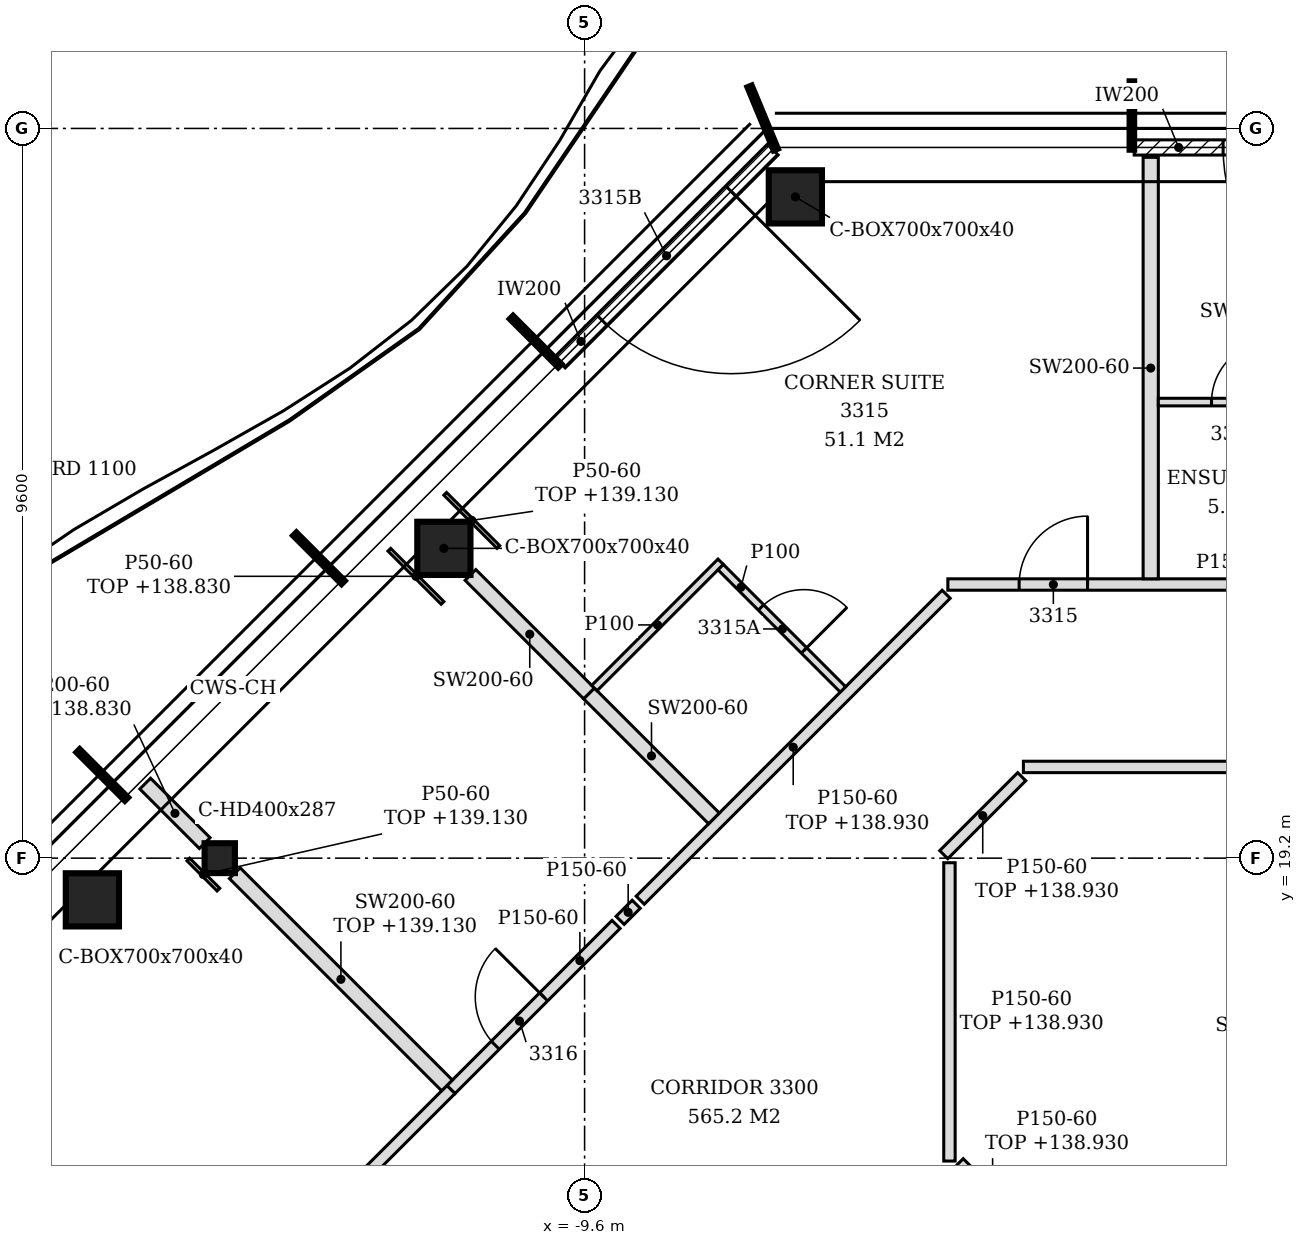
"""IFC4 building model, lengths in metres.
Left out: names, types, materials, properties, quantities, classifications, styles, units other than length and angle.
Written with IfcOpenShell. Run it as: python <this file> out.ifc"""

import sys

from ifc_helpers import new_model, si_unit, direction, frame, frame_2d, origin, origin_2d, place, context, subcontext, project, spatial, polyline, rectangle, hollow_rectangle, i_section, outline, extrude, element, fill, save


model = new_model("IFC4")
c1 = context("Model", 3, precision=1e-05, world=origin(), true_north=direction((0.0, 1.0)))
c2 = subcontext(c1, "Body", "Model", "MODEL_VIEW")
j1 = project(units=[si_unit("LENGTHUNIT", "METRE"), si_unit("PLANEANGLEUNIT", "RADIAN")], contexts=[c1])
p1 = place(None, origin())
s1 = spatial("IfcSite", under=j1, at=p1, CompositionType="ELEMENT")
p2 = place(p1, origin())
s2 = spatial("IfcBuilding", under=s1, at=p2, CompositionType="ELEMENT")
p3 = place(p2, frame((0.0, 0.0, 136.2)))
s3 = spatial("IfcBuildingStorey", under=s2, at=p3, CompositionType="ELEMENT", Elevation=136.2)
for number, where, z_axis, x_axis in (
    (1, (-6.827, 27.9, -0.15), (0.0, 0.0, 1.0), (1.0, 0.0, 0.0)),
    (2, (-11.451, 23.276, -0.15), (0.0, 0.0, 1.0), (1.0, 0.0, 0.0)),
    (3, (-16.076, 18.652, -0.15), (0.0, 0.0, 1.0), (1.0, 0.0, 0.0)),
):
    element("IfcColumn", number, at=place(p3, frame(where, z_axis=z_axis, x_axis=x_axis)), inside=s3, PredefinedType="COLUMN", context=c2, shape_type="SweptSolid", body=[
        extrude(hollow_rectangle(XDim=0.7, YDim=0.7, WallThickness=0.04, at=origin_2d()), origin(), (0.0, 0.0, 1.0), 3.6),
    ])
p4 = place(p3, frame((-14.4, 19.2, -0.15), z_axis=(0.0, 0.0, 1.0), x_axis=(1.0, 0.0, 0.0)))
e4 = element("IfcColumn", 4, at=p4, inside=s3, PredefinedType="COLUMN", context=c2, shape_type="SweptSolid", body=[
    extrude(i_section(OverallWidth=0.399, OverallDepth=0.393, WebThickness=0.023, FlangeThickness=0.037, FilletRadius=0.015, at=origin_2d()), origin(), (0.0, 0.0, 1.0), 3.6),
])
p5 = place(p3, frame((2.37, 28.55, 0.0), z_axis=(0.0, 0.0, 1.0), x_axis=(-1.0, 0.0, 0.0)))
e5 = element("IfcWall", 5, at=p5, inside=s3, PredefinedType="NOTDEFINED", context=c2, shape_type="SweptSolid", body=[
    extrude(rectangle(XDim=4.74, YDim=0.2, at=frame_2d((2.37, 0.0))), origin(), (0.0, 0.0, 1.0), 3.45),
])
p6 = place(p5, frame((1.17, 0.0, 0.0)))
e6 = element("IfcOpeningElement", 6, at=p6, cuts=e5, PredefinedType="OPENING", context=c2, shape_type="SweptSolid", body=[
    extrude(rectangle(XDim=2.4, YDim=2.4, at=frame_2d((1.2, 1.2))), frame((0.0, 0.11, 0.0), z_axis=(0.0, -1.0, 0.0), x_axis=(1.0, 0.0, 0.0)), (0.0, 0.0, 1.0), 0.22),
])
p7 = place(p3, frame((-7.125, 28.522, 0.0), z_axis=(0.0, 0.0, 1.0), x_axis=(-0.707106781187, -0.707106781187, 0.0)))
e7 = element("IfcWall", 7, at=p7, inside=s3, PredefinedType="NOTDEFINED", context=c2, shape_type="SweptSolid", body=[
    extrude(rectangle(XDim=3.962, YDim=0.2, at=frame_2d((1.981, 0.0))), origin(), (0.0, 0.0, 1.0), 3.45),
])
p8 = place(p7, frame((0.775, 0.0, 0.0)))
e8 = element("IfcOpeningElement", 8, at=p8, cuts=e7, PredefinedType="OPENING", context=c2, shape_type="SweptSolid", body=[
    extrude(rectangle(XDim=2.4, YDim=2.4, at=frame_2d((1.2, 1.2))), frame((0.0, 0.11, 0.0), z_axis=(0.0, -1.0, 0.0), x_axis=(1.0, 0.0, 0.0)), (0.0, 0.0, 1.0), 0.22),
])
p9 = place(p3, frame((-15.675, 11.84, 0.0), z_axis=(0.0, 0.0, 1.0), x_axis=(0.707206735496, 0.707006812746, 0.0)))
e9 = element("IfcWall", 9, at=p9, inside=s3, PredefinedType="PARTITIONING", context=c2, shape_type="SweptSolid", body=[
    extrude(rectangle(XDim=6.106, YDim=0.15, at=frame_2d((3.053, 0.0))), origin(), (0.0, 0.0, 1.0), 2.93),
])
p10 = place(p9, frame((2.656, 0.0, 0.0)))
e10 = element("IfcOpeningElement", 10, at=p10, cuts=e9, PredefinedType="OPENING", context=c2, shape_type="SweptSolid", body=[
    extrude(rectangle(XDim=0.9, YDim=2.1, at=frame_2d((0.45, 1.05))), frame((0.0, 0.085, 0.0), z_axis=(0.0, -1.0, 0.0), x_axis=(1.0, 0.0, 0.0)), (0.0, 0.0, 1.0), 0.17),
])
p11 = place(p3, frame((-3.792, 14.314, 0.0), z_axis=(0.0, 0.0, 1.0), x_axis=(-0.707499182195, 0.706714162298, 0.0)))
e11 = element("IfcWall", 11, at=p11, inside=s3, PredefinedType="PARTITIONING", context=c2, shape_type="SweptSolid", body=[
    extrude(rectangle(XDim=1.244, YDim=0.15, at=frame_2d((0.622, 0.0))), origin(), (0.0, 0.0, 1.0), 2.73),
])
p12 = place(p3, frame((-4.8, 15.215, 0.0), z_axis=(0.0, 0.0, 1.0), x_axis=(0.0, 1.0, 0.0)))
e12 = element("IfcWall", 12, at=p12, inside=s3, PredefinedType="PARTITIONING", context=c2, shape_type="SweptSolid", body=[
    extrude(rectangle(XDim=3.925, YDim=0.15, at=frame_2d((1.962, 0.0))), origin(), (0.0, 0.0, 1.0), 2.73),
])
p13 = place(p3, frame((-11.357, 16.157, 0.0), z_axis=(0.0, 0.0, 1.0), x_axis=(0.707106781187, 0.707106781187, 0.0)))
e13 = element("IfcWall", 13, at=p13, inside=s3, PredefinedType="PARTITIONING", context=c2, shape_type="SweptSolid", body=[
    extrude(rectangle(XDim=3.071, YDim=0.15, at=frame_2d((1.535, 0.0))), origin(), (0.0, 0.0, 1.0), 3.45),
])
p14 = place(p13, frame((0.823, 0.0, 0.0)))
e14 = element("IfcOpeningElement", 14, at=p14, cuts=e13, PredefinedType="OPENING", context=c2, shape_type="SweptSolid", body=[
    extrude(rectangle(XDim=0.9, YDim=2.1, at=frame_2d((0.45, 1.05))), frame((0.0, 0.085, 0.0), z_axis=(0.0, -1.0, 0.0), x_axis=(1.0, 0.0, 0.0)), (0.0, 0.0, 1.0), 0.17),
])
p15 = place(p3, frame((-11.41, 16.21, 0.0), z_axis=(0.0, 0.0, 1.0), x_axis=(-0.707106781187, 0.707106781187, 0.0)))
e15 = element("IfcWall", 15, at=p15, inside=s3, PredefinedType="PARTITIONING", context=c2, shape_type="SweptSolid", body=[
    extrude(rectangle(XDim=3.948, YDim=0.2, at=frame_2d((1.974, 0.0))), origin(), (0.0, 0.0, 1.0), 2.93),
])
p16 = place(p3, frame((-9.133, 18.382, 0.0), z_axis=(0.0, 0.0, 1.0), x_axis=(0.707106781187, 0.707106781187, 0.0)))
e16 = element("IfcWall", 16, at=p16, inside=s3, PredefinedType="PARTITIONING", context=c2, shape_type="SweptSolid", body=[
    extrude(rectangle(XDim=0.3, YDim=0.15, at=frame_2d((0.15, 0.0))), origin(), (0.0, 0.0, 1.0), 3.45),
])
p17 = place(p3, frame((-8.868, 18.647, 0.0), z_axis=(0.0, 0.0, 1.0), x_axis=(0.707085337138, 0.707128224585, 0.0)))
e17 = element("IfcWall", 17, at=p17, inside=s3, PredefinedType="PARTITIONING", context=c2, shape_type="SweptSolid", body=[
    extrude(rectangle(XDim=5.693, YDim=0.15, at=frame_2d((2.846, 0.0))), origin(), (0.0, 0.0, 1.0), 2.73),
])
p18 = place(p3, frame((-4.875, 19.246, 0.0), z_axis=(0.0, 0.0, 1.0), x_axis=(0.707106781187, 0.707106781187, 0.0)))
e18 = element("IfcWall", 18, at=p18, inside=s3, PredefinedType="PARTITIONING", context=c2, shape_type="SweptSolid", body=[
    extrude(rectangle(XDim=1.451, YDim=0.15, at=frame_2d((0.726, 0.0))), origin(), (0.0, 0.0, 1.0), 2.73),
])
p19 = place(p3, frame((-14.598, 19.398, 0.0), z_axis=(0.0, 0.0, 1.0), x_axis=(-0.707106781187, 0.707106781187, 0.0)))
e19 = element("IfcWall", 19, at=p19, inside=s3, PredefinedType="PARTITIONING", context=c2, shape_type="SweptSolid", body=[
    extrude(rectangle(XDim=1.107, YDim=0.2, at=frame_2d((0.554, 0.0))), origin(), (0.0, 0.0, 1.0), 2.63),
])
p20 = place(p3, frame((-7.898, 19.723, 0.0), z_axis=(0.0, 0.0, 1.0), x_axis=(-0.707106781187, 0.707106781187, 0.0)))
e20 = element("IfcWall", 20, at=p20, inside=s3, PredefinedType="PARTITIONING", context=c2, shape_type="SweptSolid", body=[
    extrude(rectangle(XDim=2.325, YDim=0.2, at=frame_2d((1.163, 0.0))), origin(), (0.0, 0.0, 1.0), 3.45),
])
p21 = place(p3, frame((-3.827, 20.4, 0.0), z_axis=(0.0, 0.0, 1.0), x_axis=(1.0, 0.0, 0.0)))
e21 = element("IfcWall", 21, at=p21, inside=s3, PredefinedType="PARTITIONING", context=c2, shape_type="SweptSolid", body=[
    extrude(rectangle(XDim=8.702, YDim=0.15, at=frame_2d((4.351, 0.0))), origin(), (0.0, 0.0, 1.0), 3.45),
])
p22 = place(p3, frame((-9.542, 21.367, 0.0), z_axis=(0.0, 0.0, 1.0), x_axis=(-0.707217500167, 0.706996044867, 0.0)))
e22 = element("IfcWall", 22, at=p22, inside=s3, PredefinedType="PARTITIONING", context=c2, shape_type="SweptSolid", body=[
    extrude(rectangle(XDim=2.205, YDim=0.2, at=frame_2d((1.103, 0.0))), origin(), (0.0, 0.0, 1.0), 3.45),
])
p23 = place(p3, frame((-9.471, 21.438, 0.0), z_axis=(0.0, 0.0, 1.0), x_axis=(0.707054828152, 0.707158730404, 0.0)))
e23 = element("IfcWall", 23, at=p23, inside=s3, PredefinedType="PARTITIONING", context=c2, shape_type="SweptSolid", body=[
    extrude(rectangle(XDim=2.35, YDim=0.1, at=frame_2d((1.175, 0.0))), origin(), (0.0, 0.0, 1.0), 3.45),
])
p24 = place(p3, frame((-6.201, 21.42, 0.0), z_axis=(0.0, 0.0, 1.0), x_axis=(-0.707106781187, 0.707106781187, 0.0)))
e24 = element("IfcWall", 24, at=p24, inside=s3, PredefinedType="PARTITIONING", context=c2, shape_type="SweptSolid", body=[
    extrude(rectangle(XDim=2.275, YDim=0.1, at=frame_2d((1.137, 0.0))), origin(), (0.0, 0.0, 1.0), 3.45),
])
p25 = place(p24, frame((0.725, 0.0, 0.0)))
e25 = element("IfcOpeningElement", 25, at=p25, cuts=e24, PredefinedType="OPENING", context=c2, shape_type="SweptSolid", body=[
    extrude(rectangle(XDim=0.8, YDim=2.1, at=frame_2d((0.4, 1.05))), frame((0.0, 0.06, 0.0), z_axis=(0.0, -1.0, 0.0), x_axis=(1.0, 0.0, 0.0)), (0.0, 0.0, 1.0), 0.12),
])
p26 = place(p3, frame((-4.821, 22.8, 0.0), z_axis=(0.0, 0.0, 1.0), x_axis=(1.0, 0.0, 0.0)))
e26 = element("IfcWall", 26, at=p26, inside=s3, PredefinedType="PARTITIONING", context=c2, shape_type="SweptSolid", body=[
    extrude(outline(polyline([(0.0, 0.0), (24.042, 0.0), (24.042, 2.73), (23.871, 2.73), (23.869, 3.45), (12.171, 3.45), (12.169, 2.73), (11.871, 2.73), (11.869, 3.45), (0.171, 3.45), (0.169, 2.73), (0.0, 2.73), (0.0, 0.0)])), frame((0.0, 0.075, 0.0), z_axis=(0.0, -1.0, 0.0), x_axis=(1.0, 0.0, 0.0)), (0.0, 0.0, 1.0), 0.15),
])
p27 = place(p26, frame((22.205, 0.0, 0.0)))
e27 = element("IfcOpeningElement", 27, at=p27, cuts=e26, PredefinedType="OPENING", context=c2, shape_type="SweptSolid", body=[
    extrude(rectangle(XDim=0.9, YDim=2.1, at=frame_2d((0.45, 1.05))), frame((0.0, 0.085, 0.0), z_axis=(0.0, -1.0, 0.0), x_axis=(1.0, 0.0, 0.0)), (0.0, 0.0, 1.0), 0.17),
])
p28 = place(p26, frame((19.785, 0.0, 0.0)))
e28 = element("IfcOpeningElement", 28, at=p28, cuts=e26, PredefinedType="OPENING", context=c2, shape_type="SweptSolid", body=[
    extrude(rectangle(XDim=0.9, YDim=2.1, at=frame_2d((0.45, 1.05))), frame((0.0, 0.085, 0.0), z_axis=(0.0, -1.0, 0.0), x_axis=(1.0, 0.0, 0.0)), (0.0, 0.0, 1.0), 0.17),
])
p29 = place(p26, frame((15.109, 0.0, 0.0)))
e29 = element("IfcOpeningElement", 29, at=p29, cuts=e26, PredefinedType="OPENING", context=c2, shape_type="SweptSolid", body=[
    extrude(rectangle(XDim=0.9, YDim=2.1, at=frame_2d((0.45, 1.05))), frame((0.0, 0.085, 0.0), z_axis=(0.0, -1.0, 0.0), x_axis=(1.0, 0.0, 0.0)), (0.0, 0.0, 1.0), 0.17),
])
p30 = place(p26, frame((10.433, 0.0, 0.0)))
e30 = element("IfcOpeningElement", 30, at=p30, cuts=e26, PredefinedType="OPENING", context=c2, shape_type="SweptSolid", body=[
    extrude(rectangle(XDim=0.9, YDim=2.1, at=frame_2d((0.45, 1.05))), frame((0.0, 0.085, 0.0), z_axis=(0.0, -1.0, 0.0), x_axis=(1.0, 0.0, 0.0)), (0.0, 0.0, 1.0), 0.17),
])
p31 = place(p26, frame((5.757, 0.0, 0.0)))
e31 = element("IfcOpeningElement", 31, at=p31, cuts=e26, PredefinedType="OPENING", context=c2, shape_type="SweptSolid", body=[
    extrude(rectangle(XDim=0.9, YDim=2.1, at=frame_2d((0.45, 1.05))), frame((0.0, 0.085, 0.0), z_axis=(0.0, -1.0, 0.0), x_axis=(1.0, 0.0, 0.0)), (0.0, 0.0, 1.0), 0.17),
])
p32 = place(p26, frame((0.938, 0.0, 0.0)))
e32 = element("IfcOpeningElement", 32, at=p32, cuts=e26, PredefinedType="OPENING", context=c2, shape_type="SweptSolid", body=[
    extrude(rectangle(XDim=0.9, YDim=2.1, at=frame_2d((0.45, 1.05))), frame((0.0, 0.085, 0.0), z_axis=(0.0, -1.0, 0.0), x_axis=(1.0, 0.0, 0.0)), (0.0, 0.0, 1.0), 0.17),
])
p33 = place(p3, frame((-2.152, 22.875, 0.0), z_axis=(0.0, 0.0, 1.0), x_axis=(0.0, 1.0, 0.0)))
e33 = element("IfcWall", 33, at=p33, inside=s3, PredefinedType="PARTITIONING", context=c2, shape_type="SweptSolid", body=[
    extrude(outline(polyline([(0.0, 0.0), (5.545, 0.0), (5.545, 3.45), (5.175, 3.45), (5.173, 2.93), (4.875, 2.93), (4.873, 3.45), (1.23, 3.45), (1.228, 2.88), (1.02, 2.88), (1.018, 3.45), (0.0, 3.45), (0.0, 0.0)])), frame((0.0, 0.1, 0.0), z_axis=(0.0, -1.0, 0.0), x_axis=(1.0, 0.0, 0.0)), (0.0, 0.0, 1.0), 0.2),
])
p34 = place(p3, frame((-2.052, 25.2, 0.0), z_axis=(0.0, 0.0, 1.0), x_axis=(1.0, 0.0, 0.0)))
e34 = element("IfcWall", 34, at=p34, inside=s3, PredefinedType="PARTITIONING", context=c2, shape_type="SweptSolid", body=[
    extrude(rectangle(XDim=2.35, YDim=0.1, at=frame_2d((1.175, 0.0))), origin(), (0.0, 0.0, 1.0), 3.45),
])
p35 = place(p34, frame((0.7, 0.0, 0.0)))
e35 = element("IfcOpeningElement", 35, at=p35, cuts=e34, PredefinedType="OPENING", context=c2, shape_type="SweptSolid", body=[
    extrude(rectangle(XDim=0.8, YDim=2.1, at=frame_2d((0.4, 1.05))), frame((0.0, 0.06, 0.0), z_axis=(0.0, -1.0, 0.0), x_axis=(1.0, 0.0, 0.0)), (0.0, 0.0, 1.0), 0.12),
])
p36 = place(p3, frame((-14.418, 18.786, 0.0), z_axis=(0.0, 0.0, 1.0), x_axis=(-0.707106781187, 0.707106781187, 0.0)))
e36 = element("IfcWall", 36, at=p36, inside=s3, PredefinedType="PARTITIONING", context=c2, shape_type="SweptSolid", body=[
    extrude(rectangle(XDim=0.56, YDim=0.05, at=frame_2d((0.28, 0.0))), origin(), (0.0, 0.0, 1.0), 2.93),
])
p37 = place(p3, frame((-11.469, 22.558, 0.0), z_axis=(0.0, 0.0, 1.0), x_axis=(-0.707353374636, 0.706860101711, 0.0)))
e37 = element("IfcWall", 37, at=p37, inside=s3, PredefinedType="PARTITIONING", context=c2, shape_type="SweptSolid", body=[
    extrude(rectangle(XDim=0.99, YDim=0.05, at=frame_2d((0.495, 0.0))), origin(), (0.0, 0.0, 1.0), 2.63),
])
p38 = place(p3, frame((-10.734, 23.293, 0.0), z_axis=(0.0, 0.0, 1.0), x_axis=(-0.707230067171, 0.706983473703, 0.0)))
e38 = element("IfcWall", 38, at=p38, inside=s3, PredefinedType="PARTITIONING", context=c2, shape_type="SweptSolid", body=[
    extrude(rectangle(XDim=0.99, YDim=0.05, at=frame_2d((0.495, 0.0))), origin(), (0.0, 0.0, 1.0), 2.93),
])
p39 = place(p6, origin())
e39 = element("IfcDoor", 39, at=p39, inside=s3, OperationType="SINGLE_SWING_LEFT", PredefinedType="DOOR", context=c2, shape_type="SweptSolid", body=[
    extrude(rectangle(XDim=2.4, YDim=2.4, at=frame_2d((1.2, 1.2))), frame((0.0, 0.025, 0.0), z_axis=(0.0, -1.0, 0.0), x_axis=(1.0, 0.0, 0.0)), (0.0, 0.0, 1.0), 0.05),
])
fill(e6, e39)
p40 = place(p8, origin())
e40 = element("IfcDoor", 40, at=p40, inside=s3, OperationType="SINGLE_SWING_LEFT", PredefinedType="DOOR", context=c2, shape_type="SweptSolid", body=[
    extrude(rectangle(XDim=2.4, YDim=2.4, at=frame_2d((1.2, 1.2))), frame((0.0, 0.025, 0.0), z_axis=(0.0, -1.0, 0.0), x_axis=(1.0, 0.0, 0.0)), (0.0, 0.0, 1.0), 0.05),
])
fill(e8, e40)
p41 = place(p35, origin())
e41 = element("IfcDoor", 41, at=p41, inside=s3, OperationType="SINGLE_SWING_RIGHT", PredefinedType="DOOR", context=c2, shape_type="SweptSolid", body=[
    extrude(rectangle(XDim=0.8, YDim=2.1, at=frame_2d((0.4, 1.05))), frame((0.0, 0.025, 0.0), z_axis=(0.0, -1.0, 0.0), x_axis=(1.0, 0.0, 0.0)), (0.0, 0.0, 1.0), 0.05),
])
fill(e35, e41)
p42 = place(p32, origin())
e42 = element("IfcDoor", 42, at=p42, inside=s3, OperationType="SINGLE_SWING_RIGHT", PredefinedType="DOOR", context=c2, shape_type="SweptSolid", body=[
    extrude(rectangle(XDim=0.9, YDim=2.1, at=frame_2d((0.45, 1.05))), frame((0.0, 0.025, 0.0), z_axis=(0.0, -1.0, 0.0), x_axis=(1.0, 0.0, 0.0)), (0.0, 0.0, 1.0), 0.05),
])
fill(e32, e42)
p43 = place(p25, frame((0.8, 0.0, 0.0), z_axis=(0.0, 0.0, 1.0), x_axis=(-1.0, 0.0, 0.0)))
e43 = element("IfcDoor", 43, at=p43, inside=s3, OperationType="SINGLE_SWING_RIGHT", PredefinedType="DOOR", context=c2, shape_type="SweptSolid", body=[
    extrude(rectangle(XDim=0.8, YDim=2.1, at=frame_2d((0.4, 1.05))), frame((0.0, 0.025, 0.0), z_axis=(0.0, -1.0, 0.0), x_axis=(1.0, 0.0, 0.0)), (0.0, 0.0, 1.0), 0.05),
])
fill(e25, e43)
p44 = place(p14, origin())
e44 = element("IfcDoor", 44, at=p44, inside=s3, OperationType="SINGLE_SWING_RIGHT", PredefinedType="DOOR", context=c2, shape_type="SweptSolid", body=[
    extrude(rectangle(XDim=0.9, YDim=2.1, at=frame_2d((0.45, 1.05))), frame((0.0, 0.025, 0.0), z_axis=(0.0, -1.0, 0.0), x_axis=(1.0, 0.0, 0.0)), (0.0, 0.0, 1.0), 0.05),
])
fill(e14, e44)
save(model, sys.argv[1])
